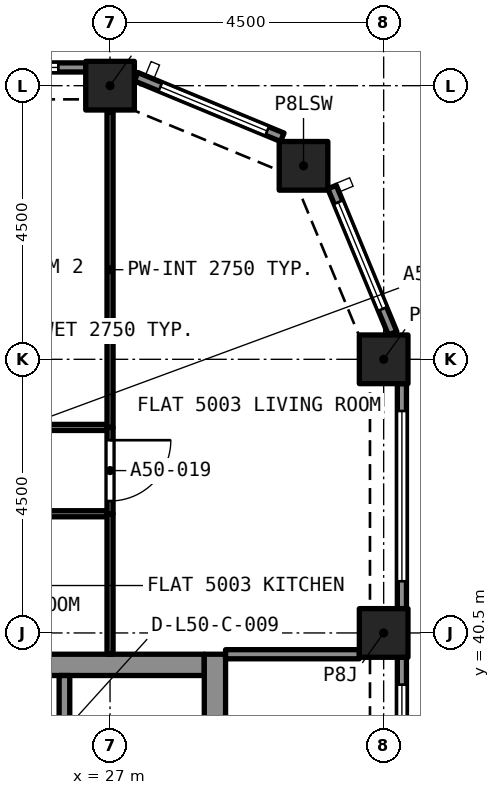
"""IFC4 building model, lengths in metres.
Left out: names, types, materials, properties, quantities, classifications, styles, units other than length and angle.
Written with IfcOpenShell. Run it as: python <this file> out.ifc"""

import sys

from ifc_helpers import new_model, si_unit, direction, frame, frame_2d, origin, origin_2d, place, context, subcontext, project, spatial, rectangle, extrude, element, fill, save


model = new_model("IFC4")
c1 = context("Model", 3, precision=1e-05, world=origin(), true_north=direction((0.0, 1.0)))
c2 = subcontext(c1, "Body", "Model", "MODEL_VIEW")
j1 = project(units=[si_unit("LENGTHUNIT", "METRE"), si_unit("PLANEANGLEUNIT", "RADIAN")], contexts=[c1])
p1 = place(None, origin())
s1 = spatial("IfcSite", under=j1, at=p1, CompositionType="ELEMENT")
p2 = place(p1, origin())
s2 = spatial("IfcBuilding", under=s1, at=p2, CompositionType="ELEMENT")
p3 = place(p2, frame((0.0, 0.0, 182.7)))
s3 = spatial("IfcBuildingStorey", under=s2, at=p3, CompositionType="ELEMENT", Elevation=182.7)
for number, where, z_axis, x_axis in (
    (1, (31.5, 40.5, 0.0), (0.0, 0.0, 1.0), (1.0, 0.0, 0.0)),
    (2, (31.5, 45.0, 0.0), (0.0, 0.0, 1.0), (1.0, 0.0, 0.0)),
    (3, (30.182, 48.182, 0.0), (0.0, 0.0, 1.0), (1.0, 0.0, 0.0)),
    (4, (27.0, 49.5, 0.0), (0.0, 0.0, 1.0), (1.0, 0.0, 0.0)),
):
    element("IfcColumn", number, at=place(p3, frame(where, z_axis=z_axis, x_axis=x_axis)), inside=s3, PredefinedType="COLUMN", context=c2, shape_type="SweptSolid", body=[
        extrude(rectangle(XDim=0.8, YDim=0.8, at=origin_2d()), origin(), (0.0, 0.0, 1.0), 3.2),
    ])
p4 = place(p3, frame((20.95, 39.975, 0.0), z_axis=(0.0, 0.0, 1.0), x_axis=(1.0, 0.0, 0.0)))
e5 = element("IfcWall", 5, at=p4, inside=s3, PredefinedType="SOLIDWALL", context=c2, shape_type="SweptSolid", body=[
    extrude(rectangle(XDim=7.6, YDim=0.35, at=frame_2d((3.8, 0.0))), origin(), (0.0, 0.0, 1.0), 3.2),
])
p5 = place(p3, frame((28.725, 27.35, 0.0), z_axis=(0.0, 0.0, 1.0), x_axis=(0.0, 1.0, 0.0)))
e6 = element("IfcWall", 6, at=p5, inside=s3, PredefinedType="SOLIDWALL", context=c2, shape_type="SweptSolid", body=[
    extrude(rectangle(XDim=12.8, YDim=0.35, at=frame_2d((6.4, 0.0))), origin(), (0.0, 0.0, 1.0), 3.2),
])
p6 = place(p5, frame((8.6, 0.0, 0.0)))
e7 = element("IfcOpeningElement", 7, at=p6, cuts=e6, PredefinedType="OPENING", context=c2, shape_type="SweptSolid", body=[
    extrude(rectangle(XDim=1.2, YDim=2.1, at=frame_2d((0.6, 1.05))), frame((0.0, 0.185, 0.0), z_axis=(0.0, -1.0, 0.0), x_axis=(1.0, 0.0, 0.0)), (0.0, 0.0, 1.0), 0.37),
])
p7 = place(p3, frame((31.8, 40.1, 0.0), z_axis=(0.0, 0.0, 1.0), x_axis=(0.0, -1.0, 0.0)))
e8 = element("IfcWall", 8, at=p7, inside=s3, PredefinedType="SOLIDWALL", context=c2, shape_type="SweptSolid", body=[
    extrude(rectangle(XDim=3.7, YDim=0.15, at=frame_2d((1.85, 0.0))), origin(), (0.0, 0.0, 1.0), 3.2),
])
p8 = place(p7, frame((0.45, 0.0, 0.45)))
e9 = element("IfcOpeningElement", 9, at=p8, cuts=e8, PredefinedType="OPENING", context=c2, shape_type="SweptSolid", body=[
    extrude(rectangle(XDim=2.8, YDim=1.95, at=frame_2d((1.4, 0.975))), frame((0.0, 0.085, 0.0), z_axis=(0.0, -1.0, 0.0), x_axis=(1.0, 0.0, 0.0)), (0.0, 0.0, 1.0), 0.17),
])
p9 = place(p3, frame((31.8, 44.6, 0.0), z_axis=(0.0, 0.0, 1.0), x_axis=(0.0, -1.0, 0.0)))
e10 = element("IfcWall", 10, at=p9, inside=s3, PredefinedType="SOLIDWALL", context=c2, shape_type="SweptSolid", body=[
    extrude(rectangle(XDim=3.7, YDim=0.15, at=frame_2d((1.85, 0.0))), origin(), (0.0, 0.0, 1.0), 3.2),
])
p10 = place(p9, frame((0.45, 0.0, 0.45)))
e11 = element("IfcOpeningElement", 11, at=p10, cuts=e10, PredefinedType="OPENING", context=c2, shape_type="SweptSolid", body=[
    extrude(rectangle(XDim=2.8, YDim=1.95, at=frame_2d((1.4, 0.975))), frame((0.0, 0.085, 0.0), z_axis=(0.0, -1.0, 0.0), x_axis=(1.0, 0.0, 0.0)), (0.0, 0.0, 1.0), 0.17),
])
p11 = place(p3, frame((30.651, 47.833, 0.0), z_axis=(0.0, 0.0, 1.0), x_axis=(0.382669406082, -0.923885342263, 0.0)))
e12 = element("IfcWall", 12, at=p11, inside=s3, PredefinedType="SOLIDWALL", context=c2, shape_type="SweptSolid", body=[
    extrude(rectangle(XDim=2.602, YDim=0.15, at=frame_2d((1.301, 0.0))), origin(), (0.0, 0.0, 1.0), 3.2),
])
p12 = place(p11, frame((0.27, 0.0, 0.45)))
e13 = element("IfcOpeningElement", 13, at=p12, cuts=e12, PredefinedType="OPENING", context=c2, shape_type="SweptSolid", body=[
    extrude(rectangle(XDim=1.9, YDim=1.95, at=frame_2d((0.95, 0.975))), frame((0.0, 0.085, 0.0), z_axis=(0.0, -1.0, 0.0), x_axis=(1.0, 0.0, 0.0)), (0.0, 0.0, 1.0), 0.17),
])
p13 = place(p3, frame((27.429, 49.647, 0.0), z_axis=(0.0, 0.0, 1.0), x_axis=(0.923885342263, -0.382669406082, 0.0)))
e14 = element("IfcWall", 14, at=p13, inside=s3, PredefinedType="SOLIDWALL", context=c2, shape_type="SweptSolid", body=[
    extrude(rectangle(XDim=2.602, YDim=0.15, at=frame_2d((1.301, 0.0))), origin(), (0.0, 0.0, 1.0), 3.2),
])
p14 = place(p13, frame((0.432, 0.0, 0.45)))
e15 = element("IfcOpeningElement", 15, at=p14, cuts=e14, PredefinedType="OPENING", context=c2, shape_type="SweptSolid", body=[
    extrude(rectangle(XDim=1.9, YDim=1.95, at=frame_2d((0.95, 0.975))), frame((0.0, 0.085, 0.0), z_axis=(0.0, -1.0, 0.0), x_axis=(1.0, 0.0, 0.0)), (0.0, 0.0, 1.0), 0.17),
])
p15 = place(p3, frame((22.9, 49.8, 0.0), z_axis=(0.0, 0.0, 1.0), x_axis=(1.0, 0.0, 0.0)))
e16 = element("IfcWall", 16, at=p15, inside=s3, PredefinedType="SOLIDWALL", context=c2, shape_type="SweptSolid", body=[
    extrude(rectangle(XDim=3.7, YDim=0.15, at=frame_2d((1.85, 0.0))), origin(), (0.0, 0.0, 1.0), 3.2),
])
p16 = place(p15, frame((0.45, 0.0, 0.45)))
e17 = element("IfcOpeningElement", 17, at=p16, cuts=e16, PredefinedType="OPENING", context=c2, shape_type="SweptSolid", body=[
    extrude(rectangle(XDim=2.8, YDim=1.95, at=frame_2d((1.4, 0.975))), frame((0.0, 0.085, 0.0), z_axis=(0.0, -1.0, 0.0), x_axis=(1.0, 0.0, 0.0)), (0.0, 0.0, 1.0), 0.17),
])
p17 = place(p3, frame((22.5, 43.88, 0.0), z_axis=(0.0, 0.0, 1.0), x_axis=(1.0, 0.0, 0.0)))
e18 = element("IfcWall", 18, at=p17, inside=s3, PredefinedType="PARTITIONING", context=c2, shape_type="SweptSolid", body=[
    extrude(rectangle(XDim=4.45, YDim=0.1, at=frame_2d((2.225, 0.0))), origin(), (0.0, 0.0, 1.0), 2.75),
])
p18 = place(p17, frame((1.8, 0.0, 0.0)))
e19 = element("IfcOpeningElement", 19, at=p18, cuts=e18, PredefinedType="OPENING", context=c2, shape_type="SweptSolid", body=[
    extrude(rectangle(XDim=0.9, YDim=2.1, at=frame_2d((0.45, 1.05))), frame((0.0, 0.06, 0.0), z_axis=(0.0, -1.0, 0.0), x_axis=(1.0, 0.0, 0.0)), (0.0, 0.0, 1.0), 0.12),
])
p19 = place(p3, frame((27.0, 43.88, 0.0), z_axis=(0.0, 0.0, 1.0), x_axis=(0.0, 1.0, 0.0)))
e20 = element("IfcWall", 20, at=p19, inside=s3, PredefinedType="PARTITIONING", context=c2, shape_type="SweptSolid", body=[
    extrude(rectangle(XDim=5.187, YDim=0.1, at=frame_2d((2.594, 0.0))), origin(), (0.0, 0.0, 1.0), 2.75),
])
p20 = place(p3, frame((26.95, 42.46, 0.0), z_axis=(0.0, 0.0, 1.0), x_axis=(-1.0, 0.0, 0.0)))
e21 = element("IfcWall", 21, at=p20, inside=s3, PredefinedType="PARTITIONING", context=c2, shape_type="SweptSolid", body=[
    extrude(rectangle(XDim=3.939, YDim=0.1, at=frame_2d((1.97, 0.0))), origin(), (0.0, 0.0, 1.0), 2.75),
])
p21 = place(p20, frame((1.495, 0.0, 0.0)))
e22 = element("IfcOpeningElement", 22, at=p21, cuts=e21, PredefinedType="OPENING", context=c2, shape_type="SweptSolid", body=[
    extrude(rectangle(XDim=0.9, YDim=2.1, at=frame_2d((0.45, 1.05))), frame((0.0, 0.06, 0.0), z_axis=(0.0, -1.0, 0.0), x_axis=(1.0, 0.0, 0.0)), (0.0, 0.0, 1.0), 0.12),
])
p22 = place(p3, frame((27.0, 43.88, 0.0), z_axis=(0.0, 0.0, 1.0), x_axis=(0.0, -1.0, 0.0)))
e23 = element("IfcWall", 23, at=p22, inside=s3, PredefinedType="PARTITIONING", context=c2, shape_type="SweptSolid", body=[
    extrude(rectangle(XDim=1.42, YDim=0.1, at=frame_2d((0.71, 0.0))), origin(), (0.0, 0.0, 1.0), 2.75),
])
p23 = place(p22, frame((0.21, 0.0, 0.0)))
e24 = element("IfcOpeningElement", 24, at=p23, cuts=e23, PredefinedType="OPENING", context=c2, shape_type="SweptSolid", body=[
    extrude(rectangle(XDim=1.0, YDim=2.1, at=frame_2d((0.5, 1.05))), frame((0.0, 0.06, 0.0), z_axis=(0.0, -1.0, 0.0), x_axis=(1.0, 0.0, 0.0)), (0.0, 0.0, 1.0), 0.12),
])
p24 = place(p3, frame((27.0, 40.15, 0.0), z_axis=(0.0, 0.0, 1.0), x_axis=(0.0, 1.0, 0.0)))
e25 = element("IfcWall", 25, at=p24, inside=s3, PredefinedType="PARTITIONING", context=c2, shape_type="SweptSolid", body=[
    extrude(rectangle(XDim=2.31, YDim=0.1, at=frame_2d((1.155, 0.0))), origin(), (0.0, 0.0, 1.0), 2.75),
])
p25 = place(p3, frame((28.9, 40.15, 0.0), z_axis=(0.0, 0.0, 1.0), x_axis=(1.0, 0.0, 0.0)))
e26 = element("IfcWall", 26, at=p25, inside=s3, PredefinedType="PARTITIONING", context=c2, shape_type="SweptSolid", body=[
    extrude(rectangle(XDim=2.2, YDim=0.15, at=frame_2d((1.1, 0.0))), origin(), (0.0, 0.0, 1.0), 2.75),
])
p26 = place(p3, frame((26.25, 37.5, 0.0), z_axis=(0.0, 0.0, 1.0), x_axis=(0.0, 1.0, 0.0)))
e27 = element("IfcWall", 27, at=p26, inside=s3, PredefinedType="SOLIDWALL", context=c2, shape_type="SweptSolid", body=[
    extrude(rectangle(XDim=2.3, YDim=0.175, at=frame_2d((1.15, 0.0))), origin(), (0.0, 0.0, 1.0), 2.9),
])
p27 = place(p8, origin())
e28 = element("IfcWindow", 28, at=p27, inside=s3, PartitioningType="SINGLE_PANEL", PredefinedType="WINDOW", context=c2, shape_type="SweptSolid", body=[
    extrude(rectangle(XDim=2.8, YDim=1.95, at=frame_2d((1.4, 0.975))), frame((0.0, 0.03, 0.0), z_axis=(0.0, -1.0, 0.0), x_axis=(1.0, 0.0, 0.0)), (0.0, 0.0, 1.0), 0.06),
])
fill(e9, e28)
p28 = place(p10, origin())
e29 = element("IfcWindow", 29, at=p28, inside=s3, PartitioningType="SINGLE_PANEL", PredefinedType="WINDOW", context=c2, shape_type="SweptSolid", body=[
    extrude(rectangle(XDim=2.8, YDim=1.95, at=frame_2d((1.4, 0.975))), frame((0.0, 0.03, 0.0), z_axis=(0.0, -1.0, 0.0), x_axis=(1.0, 0.0, 0.0)), (0.0, 0.0, 1.0), 0.06),
])
fill(e11, e29)
p29 = place(p12, origin())
e30 = element("IfcWindow", 30, at=p29, inside=s3, PartitioningType="SINGLE_PANEL", PredefinedType="WINDOW", context=c2, shape_type="SweptSolid", body=[
    extrude(rectangle(XDim=1.9, YDim=1.95, at=frame_2d((0.95, 0.975))), frame((0.0, 0.03, 0.0), z_axis=(0.0, -1.0, 0.0), x_axis=(1.0, 0.0, 0.0)), (0.0, 0.0, 1.0), 0.06),
])
fill(e13, e30)
p30 = place(p14, origin())
e31 = element("IfcWindow", 31, at=p30, inside=s3, PartitioningType="SINGLE_PANEL", PredefinedType="WINDOW", context=c2, shape_type="SweptSolid", body=[
    extrude(rectangle(XDim=1.9, YDim=1.95, at=frame_2d((0.95, 0.975))), frame((0.0, 0.03, 0.0), z_axis=(0.0, -1.0, 0.0), x_axis=(1.0, 0.0, 0.0)), (0.0, 0.0, 1.0), 0.06),
])
fill(e15, e31)
p31 = place(p16, origin())
e32 = element("IfcWindow", 32, at=p31, inside=s3, PartitioningType="SINGLE_PANEL", PredefinedType="WINDOW", context=c2, shape_type="SweptSolid", body=[
    extrude(rectangle(XDim=2.8, YDim=1.95, at=frame_2d((1.4, 0.975))), frame((0.0, 0.03, 0.0), z_axis=(0.0, -1.0, 0.0), x_axis=(1.0, 0.0, 0.0)), (0.0, 0.0, 1.0), 0.06),
])
fill(e17, e32)
p32 = place(p23, origin())
e33 = element("IfcDoor", 33, at=p32, inside=s3, OperationType="SINGLE_SWING_RIGHT", PredefinedType="DOOR", context=c2, shape_type="SweptSolid", body=[
    extrude(rectangle(XDim=1.0, YDim=2.1, at=frame_2d((0.5, 1.05))), frame((0.0, 0.025, 0.0), z_axis=(0.0, -1.0, 0.0), x_axis=(1.0, 0.0, 0.0)), (0.0, 0.0, 1.0), 0.05),
])
fill(e24, e33)
save(model, sys.argv[1])
